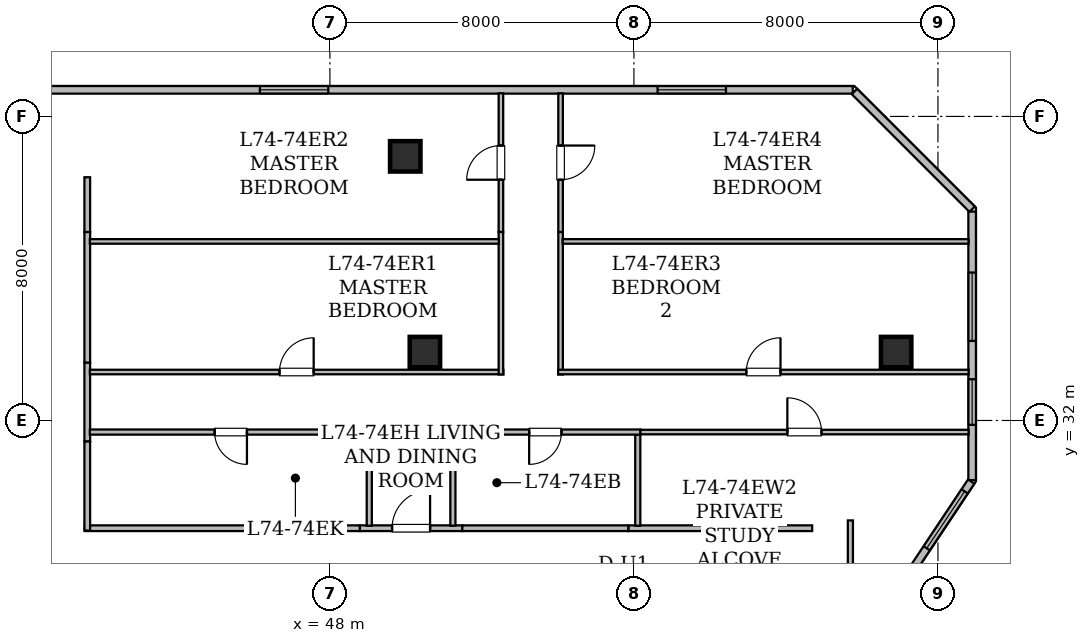
"""IFC4 building model, lengths in metres.
Left out: names, types, materials, properties, quantities, classifications, styles, units other than length and angle.
Written with IfcOpenShell. Run it as: python <this file> out.ifc"""

import sys

from ifc_helpers import new_model, si_unit, direction, frame, frame_2d, origin, origin_2d, place, context, subcontext, project, spatial, rectangle, hollow_rectangle, extrude, element, fill, save


model = new_model("IFC4")
c1 = context("Model", 3, precision=1e-05, world=origin(), true_north=direction((0.0, 1.0)))
c2 = subcontext(c1, "Body", "Model", "MODEL_VIEW")
j1 = project(units=[si_unit("LENGTHUNIT", "METRE"), si_unit("PLANEANGLEUNIT", "RADIAN")], contexts=[c1])
p1 = place(None, origin())
s1 = spatial("IfcSite", under=j1, at=p1, CompositionType="ELEMENT")
p2 = place(p1, origin())
s2 = spatial("IfcBuilding", under=s1, at=p2, CompositionType="ELEMENT")
p3 = place(p2, frame((0.0, 0.0, 290.45)))
s3 = spatial("IfcBuildingStorey", under=s2, at=p3, CompositionType="ELEMENT", Elevation=290.45)
for number, where, z_axis, x_axis in (
    (1, (49.983, 38.95, 0.0), (0.0, 0.0, 1.0), (1.0, 0.0, 0.0)),
    (2, (59.95, 38.95, 0.0), (0.0, 0.0, 1.0), (1.0, 0.0, 0.0)),
    (3, (62.9, 33.8, 0.0), (0.0, 0.0, 1.0), (1.0, 0.0, 0.0)),
):
    element("IfcColumn", number, at=place(p3, frame(where, z_axis=z_axis, x_axis=x_axis)), inside=s3, PredefinedType="COLUMN", context=c2, shape_type="SweptSolid", body=[
        extrude(hollow_rectangle(XDim=0.8, YDim=0.8, WallThickness=0.04, at=origin_2d()), origin(), (0.0, 0.0, 1.0), 4.175),
    ])
p4 = place(p3, frame((50.5, 33.8, 0.0), z_axis=(0.0, 0.0, 1.0), x_axis=(1.0, 0.0, 0.0)))
e4 = element("IfcColumn", 4, at=p4, inside=s3, PredefinedType="COLUMN", context=c2, shape_type="SweptSolid", body=[
    extrude(hollow_rectangle(XDim=0.8, YDim=0.8, WallThickness=0.04, at=origin_2d()), origin(), (0.0, 0.0, 1.0), 4.2),
])
p5 = place(p3, frame((28.302, 40.7, 0.0), z_axis=(0.0, 0.0, 1.0), x_axis=(1.0, 0.0, 0.0)))
e5 = element("IfcWall", 5, at=p5, inside=s3, PredefinedType="STANDARD", context=c2, shape_type="SweptSolid", body=[
    extrude(rectangle(XDim=33.457, YDim=0.2, at=frame_2d((16.729, 0.0))), origin(), (0.0, 0.0, 1.0), 3.78),
])
p6 = place(p5, frame((17.855, 0.0, 0.85)))
e6 = element("IfcOpeningElement", 6, at=p6, cuts=e5, PredefinedType="OPENING", context=c2, shape_type="SweptSolid", body=[
    extrude(rectangle(XDim=1.8, YDim=0.92, at=frame_2d((0.9, 0.46))), frame((0.0, 0.11, 0.0), z_axis=(0.0, -1.0, 0.0), x_axis=(1.0, 0.0, 0.0)), (0.0, 0.0, 1.0), 0.22),
])
p7 = place(p5, frame((28.32, 0.0, 0.85)))
e7 = element("IfcOpeningElement", 7, at=p7, cuts=e5, PredefinedType="OPENING", context=c2, shape_type="SweptSolid", body=[
    extrude(rectangle(XDim=1.8, YDim=0.92, at=frame_2d((0.9, 0.46))), frame((0.0, 0.11, 0.0), z_axis=(0.0, -1.0, 0.0), x_axis=(1.0, 0.0, 0.0)), (0.0, 0.0, 1.0), 0.22),
])
p8 = place(p3, frame((61.803, 40.656, 0.0), z_axis=(0.0, 0.0, 1.0), x_axis=(0.707106781187, -0.707106781187, 0.0)))
e8 = element("IfcWall", 8, at=p8, inside=s3, PredefinedType="STANDARD", context=c2, shape_type="SweptSolid", body=[
    extrude(rectangle(XDim=4.38, YDim=0.2, at=frame_2d((2.19, 0.0))), origin(), (0.0, 0.0, 1.0), 3.78),
])
p9 = place(p3, frame((64.9, 37.497, 0.0), z_axis=(0.0, 0.0, 1.0), x_axis=(0.0, -1.0, 0.0)))
e9 = element("IfcWall", 9, at=p9, inside=s3, PredefinedType="STANDARD", context=c2, shape_type="SweptSolid", body=[
    extrude(rectangle(XDim=7.067, YDim=0.2, at=frame_2d((3.534, 0.0))), origin(), (0.0, 0.0, 1.0), 3.78),
])
p10 = place(p9, frame((4.412, 0.0, 0.78)))
e10 = element("IfcOpeningElement", 10, at=p10, cuts=e9, PredefinedType="OPENING", context=c2, shape_type="SweptSolid", body=[
    extrude(rectangle(XDim=1.2, YDim=1.5, at=frame_2d((0.6, 0.75))), frame((0.0, 0.11, 0.0), z_axis=(0.0, -1.0, 0.0), x_axis=(1.0, 0.0, 0.0)), (0.0, 0.0, 1.0), 0.22),
])
p11 = place(p9, frame((1.604, 0.0, 0.85)))
e11 = element("IfcOpeningElement", 11, at=p11, cuts=e9, PredefinedType="OPENING", context=c2, shape_type="SweptSolid", body=[
    extrude(rectangle(XDim=1.8, YDim=0.92, at=frame_2d((0.9, 0.46))), frame((0.0, 0.11, 0.0), z_axis=(0.0, -1.0, 0.0), x_axis=(1.0, 0.0, 0.0)), (0.0, 0.0, 1.0), 0.22),
])
p12 = place(p3, frame((64.875, 30.392, 0.0), z_axis=(0.0, 0.0, 1.0), x_axis=(-0.554758983133, -0.832011100066, 0.0)))
e12 = element("IfcWall", 12, at=p12, inside=s3, PredefinedType="STANDARD", context=c2, shape_type="SweptSolid", body=[
    extrude(rectangle(XDim=2.875, YDim=0.2, at=frame_2d((1.438, 0.0))), origin(), (0.0, 0.0, 1.0), 3.78),
])
p13 = place(p12, frame((0.309, 0.0, 0.85)))
e13 = element("IfcOpeningElement", 13, at=p13, cuts=e12, PredefinedType="OPENING", context=c2, shape_type="SweptSolid", body=[
    extrude(rectangle(XDim=1.8, YDim=0.92, at=frame_2d((0.9, 0.46))), frame((0.0, 0.11, 0.0), z_axis=(0.0, -1.0, 0.0), x_axis=(1.0, 0.0, 0.0)), (0.0, 0.0, 1.0), 0.22),
])
p14 = place(p3, frame((55.852, 29.165, 0.0), z_axis=(0.0, 0.0, 1.0), x_axis=(1.0, 0.0, 0.0)))
e14 = element("IfcWall", 14, at=p14, inside=s3, PredefinedType="STANDARD", context=c2, shape_type="SweptSolid", body=[
    extrude(rectangle(XDim=4.838, YDim=0.15, at=frame_2d((2.419, 0.0))), origin(), (0.0, 0.0, 1.0), 3.78),
])
p15 = place(p3, frame((48.787, 29.165, 0.0), z_axis=(0.0, 0.0, 1.0), x_axis=(1.0, 0.0, 0.0)))
e15 = element("IfcWall", 15, at=p15, inside=s3, PredefinedType="STANDARD", context=c2, shape_type="SweptSolid", body=[
    extrude(rectangle(XDim=2.698, YDim=0.15, at=frame_2d((1.349, 0.0))), origin(), (0.0, 0.0, 1.0), 2.22),
])
p16 = place(p15, frame((0.849, 0.0, 0.0)))
e16 = element("IfcOpeningElement", 16, at=p16, cuts=e15, PredefinedType="OPENING", context=c2, shape_type="SweptSolid", body=[
    extrude(rectangle(XDim=1.0, YDim=2.15, at=frame_2d((0.5, 1.075))), frame((0.0, 0.085, 0.0), z_axis=(0.0, -1.0, 0.0), x_axis=(1.0, 0.0, 0.0)), (0.0, 0.0, 1.0), 0.17),
])
p17 = place(p3, frame((41.615, 33.524, 0.0), z_axis=(0.0, 0.0, 1.0), x_axis=(0.0, -1.0, 0.0)))
e17 = element("IfcWall", 17, at=p17, inside=s3, PredefinedType="STANDARD", context=c2, shape_type="SweptSolid", body=[
    extrude(rectangle(XDim=2.078, YDim=0.15, at=frame_2d((1.039, 0.0))), origin(), (0.0, 0.0, 1.0), 2.22),
])
p18 = place(p3, frame((51.485, 29.165, 0.0), z_axis=(0.0, 0.0, 1.0), x_axis=(1.0, 0.0, 0.0)))
e18 = element("IfcWall", 18, at=p18, inside=s3, PredefinedType="STANDARD", context=c2, shape_type="SweptSolid", body=[
    extrude(rectangle(XDim=4.367, YDim=0.15, at=frame_2d((2.184, 0.0))), origin(), (0.0, 0.0, 1.0), 2.22),
])
p19 = place(p3, frame((41.55, 29.165, 0.0), z_axis=(0.0, 0.0, 1.0), x_axis=(1.0, 0.0, 0.0)))
e19 = element("IfcWall", 19, at=p19, inside=s3, PredefinedType="STANDARD", context=c2, shape_type="SweptSolid", body=[
    extrude(rectangle(XDim=7.237, YDim=0.15, at=frame_2d((3.619, 0.0))), origin(), (0.0, 0.0, 1.0), 3.78),
])
p20 = place(p3, frame((41.615, 31.446, 0.0), z_axis=(0.0, 0.0, 1.0), x_axis=(0.0, -1.0, 0.0)))
e20 = element("IfcWall", 20, at=p20, inside=s3, PredefinedType="STANDARD", context=c2, shape_type="SweptSolid", body=[
    extrude(rectangle(XDim=2.344, YDim=0.15, at=frame_2d((1.172, 0.0))), origin(), (0.0, 0.0, 1.0), 3.78),
])
p21 = place(p3, frame((41.615, 36.96, 0.0), z_axis=(0.0, 0.0, 1.0), x_axis=(0.0, -1.0, 0.0)))
e21 = element("IfcWall", 21, at=p21, inside=s3, PredefinedType="STANDARD", context=c2, shape_type="SweptSolid", body=[
    extrude(rectangle(XDim=3.436, YDim=0.15, at=frame_2d((1.718, 0.0))), origin(), (0.0, 0.0, 1.0), 2.22),
])
p22 = place(p3, frame((41.615, 38.4, 0.0), z_axis=(0.0, 0.0, 1.0), x_axis=(0.0, -1.0, 0.0)))
e22 = element("IfcWall", 22, at=p22, inside=s3, PredefinedType="STANDARD", context=c2, shape_type="SweptSolid", body=[
    extrude(rectangle(XDim=1.44, YDim=0.15, at=frame_2d((0.72, 0.0))), origin(), (0.0, 0.0, 1.0), 2.22),
])
p23 = place(p3, frame((61.696, 23.687, 0.0), z_axis=(0.0, 0.0, 1.0), x_axis=(0.0, 1.0, 0.0)))
e23 = element("IfcWall", 23, at=p23, inside=s3, PredefinedType="PARTITIONING", context=c2, shape_type="SweptSolid", body=[
    extrude(rectangle(XDim=5.683, YDim=0.135, at=frame_2d((2.842, 0.0))), origin(), (0.0, 0.0, 1.0), 2.22),
])
p24 = place(p3, frame((56.166, 31.695, 0.0), z_axis=(0.0, 0.0, 1.0), x_axis=(1.0, 0.0, 0.0)))
e24 = element("IfcWall", 24, at=p24, inside=s3, PredefinedType="PARTITIONING", context=c2, shape_type="SweptSolid", body=[
    extrude(rectangle(XDim=8.642, YDim=0.12, at=frame_2d((4.321, 0.0))), origin(), (0.0, 0.0, 1.0), 2.22),
])
p25 = place(p24, frame((3.871, 0.0, 0.0)))
e25 = element("IfcOpeningElement", 25, at=p25, cuts=e24, PredefinedType="OPENING", context=c2, shape_type="SweptSolid", body=[
    extrude(rectangle(XDim=0.9, YDim=2.1, at=frame_2d((0.45, 1.05))), frame((0.0, 0.07, 0.0), z_axis=(0.0, -1.0, 0.0), x_axis=(1.0, 0.0, 0.0)), (0.0, 0.0, 1.0), 0.14),
])
p26 = place(p3, frame((56.101, 29.23, 0.0), z_axis=(0.0, 0.0, 1.0), x_axis=(0.0, 1.0, 0.0)))
e26 = element("IfcWall", 26, at=p26, inside=s3, PredefinedType="PARTITIONING", context=c2, shape_type="SweptSolid", body=[
    extrude(rectangle(XDim=2.4, YDim=0.135, at=frame_2d((1.2, 0.0))), origin(), (0.0, 0.0, 1.0), 3.78),
])
p27 = place(p3, frame((56.166, 31.695, 0.0), z_axis=(0.0, 0.0, 1.0), x_axis=(-1.0, 0.0, 0.0)))
e27 = element("IfcWall", 27, at=p27, inside=s3, PredefinedType="PARTITIONING", context=c2, shape_type="SweptSolid", body=[
    extrude(rectangle(XDim=4.995, YDim=0.135, at=frame_2d((2.498, 0.0))), origin(), (0.0, 0.0, 1.0), 2.22),
])
p28 = place(p27, frame((2.073, 0.0, 0.0)))
e28 = element("IfcOpeningElement", 28, at=p28, cuts=e27, PredefinedType="OPENING", context=c2, shape_type="SweptSolid", body=[
    extrude(rectangle(XDim=0.85, YDim=2.1, at=frame_2d((0.425, 1.05))), frame((0.0, 0.077, 0.0), z_axis=(0.0, -1.0, 0.0), x_axis=(1.0, 0.0, 0.0)), (0.0, 0.0, 1.0), 0.155),
])
for number, where, z_axis, x_axis in (
    (29, (51.236, 31.76, 0.0), (0.0, 0.0, 1.0), (0.0, -1.0, 0.0)),
    (30, (49.036, 29.23, 0.0), (0.0, 0.0, 1.0), (0.0, 1.0, 0.0)),
):
    element("IfcWall", number, at=place(p3, frame(where, z_axis=z_axis, x_axis=x_axis)), inside=s3, PredefinedType="PARTITIONING", context=c2, shape_type="SweptSolid", body=[
        extrude(rectangle(XDim=2.53, YDim=0.135, at=frame_2d((1.265, 0.0))), origin(), (0.0, 0.0, 1.0), 3.78),
    ])
p29 = place(p3, frame((49.101, 31.695, 0.0), z_axis=(0.0, 0.0, 1.0), x_axis=(-1.0, 0.0, 0.0)))
e31 = element("IfcWall", 31, at=p29, inside=s3, PredefinedType="PARTITIONING", context=c2, shape_type="SweptSolid", body=[
    extrude(rectangle(XDim=7.419, YDim=0.135, at=frame_2d((3.709, 0.0))), origin(), (0.0, 0.0, 1.0), 3.78),
])
p30 = place(p29, frame((3.284, 0.0, 0.0)))
e32 = element("IfcOpeningElement", 32, at=p30, cuts=e31, PredefinedType="OPENING", context=c2, shape_type="SweptSolid", body=[
    extrude(rectangle(XDim=0.85, YDim=2.1, at=frame_2d((0.425, 1.05))), frame((0.0, 0.077, 0.0), z_axis=(0.0, -1.0, 0.0), x_axis=(1.0, 0.0, 0.0)), (0.0, 0.0, 1.0), 0.155),
])
p31 = place(p3, frame((41.682, 33.275, 0.0), z_axis=(0.0, 0.0, 1.0), x_axis=(1.0, 0.0, 0.0)))
e33 = element("IfcWall", 33, at=p31, inside=s3, PredefinedType="PARTITIONING", context=c2, shape_type="SweptSolid", body=[
    extrude(rectangle(XDim=10.883, YDim=0.12, at=frame_2d((5.441, 0.0))), origin(), (0.0, 0.0, 1.0), 2.22),
])
p32 = place(p31, frame((4.991, 0.0, 0.0)))
e34 = element("IfcOpeningElement", 34, at=p32, cuts=e33, PredefinedType="OPENING", context=c2, shape_type="SweptSolid", body=[
    extrude(rectangle(XDim=0.9, YDim=2.1, at=frame_2d((0.45, 1.05))), frame((0.0, 0.07, 0.0), z_axis=(0.0, -1.0, 0.0), x_axis=(1.0, 0.0, 0.0)), (0.0, 0.0, 1.0), 0.14),
])
p33 = place(p3, frame((52.5, 33.21, 0.0), z_axis=(0.0, 0.0, 1.0), x_axis=(0.0, 1.0, 0.0)))
e35 = element("IfcWall", 35, at=p33, inside=s3, PredefinedType="PARTITIONING", context=c2, shape_type="SweptSolid", body=[
    extrude(rectangle(XDim=3.75, YDim=0.12, at=frame_2d((1.875, 0.0))), origin(), (0.0, 0.0, 1.0), 2.22),
])
p34 = place(p3, frame((52.5, 36.96, 0.0), z_axis=(0.0, 0.0, 1.0), x_axis=(0.0, 1.0, 0.0)))
e36 = element("IfcWall", 36, at=p34, inside=s3, PredefinedType="PARTITIONING", context=c2, shape_type="SweptSolid", body=[
    extrude(rectangle(XDim=3.648, YDim=0.12, at=frame_2d((1.824, 0.0))), origin(), (0.0, 0.0, 1.0), 2.22),
])
p35 = place(p34, frame((1.374, 0.0, 0.0)))
e37 = element("IfcOpeningElement", 37, at=p35, cuts=e36, PredefinedType="OPENING", context=c2, shape_type="SweptSolid", body=[
    extrude(rectangle(XDim=0.9, YDim=2.1, at=frame_2d((0.45, 1.05))), frame((0.0, 0.07, 0.0), z_axis=(0.0, -1.0, 0.0), x_axis=(1.0, 0.0, 0.0)), (0.0, 0.0, 1.0), 0.14),
])
p36 = place(p3, frame((54.07, 36.96, 0.0), z_axis=(0.0, 0.0, 1.0), x_axis=(0.0, -1.0, 0.0)))
e38 = element("IfcWall", 38, at=p36, inside=s3, PredefinedType="PARTITIONING", context=c2, shape_type="SweptSolid", body=[
    extrude(rectangle(XDim=3.75, YDim=0.12, at=frame_2d((1.875, 0.0))), origin(), (0.0, 0.0, 1.0), 2.22),
])
p37 = place(p3, frame((54.005, 33.275, 0.0), z_axis=(0.0, 0.0, 1.0), x_axis=(1.0, 0.0, 0.0)))
e39 = element("IfcWall", 39, at=p37, inside=s3, PredefinedType="PARTITIONING", context=c2, shape_type="SweptSolid", body=[
    extrude(rectangle(XDim=10.803, YDim=0.12, at=frame_2d((5.402, 0.0))), origin(), (0.0, 0.0, 1.0), 2.22),
])
p38 = place(p37, frame((4.952, 0.0, 0.0)))
e40 = element("IfcOpeningElement", 40, at=p38, cuts=e39, PredefinedType="OPENING", context=c2, shape_type="SweptSolid", body=[
    extrude(rectangle(XDim=0.9, YDim=2.1, at=frame_2d((0.45, 1.05))), frame((0.0, 0.07, 0.0), z_axis=(0.0, -1.0, 0.0), x_axis=(1.0, 0.0, 0.0)), (0.0, 0.0, 1.0), 0.14),
])
p39 = place(p3, frame((54.07, 40.608, 0.0), z_axis=(0.0, 0.0, 1.0), x_axis=(0.0, -1.0, 0.0)))
e41 = element("IfcWall", 41, at=p39, inside=s3, PredefinedType="PARTITIONING", context=c2, shape_type="SweptSolid", body=[
    extrude(rectangle(XDim=3.648, YDim=0.12, at=frame_2d((1.824, 0.0))), origin(), (0.0, 0.0, 1.0), 2.22),
])
p40 = place(p39, frame((1.374, 0.0, 0.0)))
e42 = element("IfcOpeningElement", 42, at=p40, cuts=e41, PredefinedType="OPENING", context=c2, shape_type="SweptSolid", body=[
    extrude(rectangle(XDim=0.9, YDim=2.1, at=frame_2d((0.45, 1.05))), frame((0.0, 0.07, 0.0), z_axis=(0.0, -1.0, 0.0), x_axis=(1.0, 0.0, 0.0)), (0.0, 0.0, 1.0), 0.14),
])
p41 = place(p3, frame((41.682, 36.711, 0.0), z_axis=(0.0, 0.0, 1.0), x_axis=(1.0, 0.0, 0.0)))
e43 = element("IfcWall", 43, at=p41, inside=s3, PredefinedType="PARTITIONING", context=c2, shape_type="SweptSolid", body=[
    extrude(rectangle(XDim=10.764, YDim=0.12, at=frame_2d((5.382, 0.0))), origin(), (0.0, 0.0, 1.0), 2.22),
])
p42 = place(p3, frame((54.124, 36.711, 0.0), z_axis=(0.0, 0.0, 1.0), x_axis=(1.0, 0.0, 0.0)))
e44 = element("IfcWall", 44, at=p42, inside=s3, PredefinedType="PARTITIONING", context=c2, shape_type="SweptSolid", body=[
    extrude(rectangle(XDim=10.684, YDim=0.12, at=frame_2d((5.342, 0.0))), origin(), (0.0, 0.0, 1.0), 2.22),
])
p43 = place(p13, origin())
e45 = element("IfcWindow", 45, at=p43, inside=s3, PartitioningType="SINGLE_PANEL", PredefinedType="WINDOW", context=c2, shape_type="SweptSolid", body=[
    extrude(rectangle(XDim=1.8, YDim=0.92, at=frame_2d((0.9, 0.46))), frame((0.0, 0.03, 0.0), z_axis=(0.0, -1.0, 0.0), x_axis=(1.0, 0.0, 0.0)), (0.0, 0.0, 1.0), 0.06),
])
fill(e13, e45)
p44 = place(p10, origin())
e46 = element("IfcWindow", 46, at=p44, inside=s3, PartitioningType="SINGLE_PANEL", PredefinedType="WINDOW", context=c2, shape_type="SweptSolid", body=[
    extrude(rectangle(XDim=1.2, YDim=1.5, at=frame_2d((0.6, 0.75))), frame((0.0, 0.03, 0.0), z_axis=(0.0, -1.0, 0.0), x_axis=(1.0, 0.0, 0.0)), (0.0, 0.0, 1.0), 0.06),
])
fill(e10, e46)
p45 = place(p6, origin())
e47 = element("IfcWindow", 47, at=p45, inside=s3, PartitioningType="SINGLE_PANEL", PredefinedType="WINDOW", context=c2, shape_type="SweptSolid", body=[
    extrude(rectangle(XDim=1.8, YDim=0.92, at=frame_2d((0.9, 0.46))), frame((0.0, 0.03, 0.0), z_axis=(0.0, -1.0, 0.0), x_axis=(1.0, 0.0, 0.0)), (0.0, 0.0, 1.0), 0.06),
])
fill(e6, e47)
p46 = place(p11, origin())
e48 = element("IfcWindow", 48, at=p46, inside=s3, PartitioningType="SINGLE_PANEL", PredefinedType="WINDOW", context=c2, shape_type="SweptSolid", body=[
    extrude(rectangle(XDim=1.8, YDim=0.92, at=frame_2d((0.9, 0.46))), frame((0.0, 0.03, 0.0), z_axis=(0.0, -1.0, 0.0), x_axis=(1.0, 0.0, 0.0)), (0.0, 0.0, 1.0), 0.06),
])
fill(e11, e48)
p47 = place(p7, origin())
e49 = element("IfcWindow", 49, at=p47, inside=s3, PartitioningType="SINGLE_PANEL", PredefinedType="WINDOW", context=c2, shape_type="SweptSolid", body=[
    extrude(rectangle(XDim=1.8, YDim=0.92, at=frame_2d((0.9, 0.46))), frame((0.0, 0.03, 0.0), z_axis=(0.0, -1.0, 0.0), x_axis=(1.0, 0.0, 0.0)), (0.0, 0.0, 1.0), 0.06),
])
fill(e7, e49)
p48 = place(p16, origin())
e50 = element("IfcDoor", 50, at=p48, inside=s3, OperationType="SINGLE_SWING_RIGHT", PredefinedType="DOOR", context=c2, shape_type="SweptSolid", body=[
    extrude(rectangle(XDim=1.0, YDim=2.15, at=frame_2d((0.5, 1.075))), frame((0.0, 0.025, 0.0), z_axis=(0.0, -1.0, 0.0), x_axis=(1.0, 0.0, 0.0)), (0.0, 0.0, 1.0), 0.05),
])
fill(e16, e50)
p49 = place(p25, origin())
e51 = element("IfcDoor", 51, at=p49, inside=s3, OperationType="SINGLE_SWING_LEFT", PredefinedType="DOOR", context=c2, shape_type="SweptSolid", body=[
    extrude(rectangle(XDim=0.9, YDim=2.1, at=frame_2d((0.45, 1.05))), frame((0.0, 0.025, 0.0), z_axis=(0.0, -1.0, 0.0), x_axis=(1.0, 0.0, 0.0)), (0.0, 0.0, 1.0), 0.05),
])
fill(e25, e51)
p50 = place(p28, origin())
e52 = element("IfcDoor", 52, at=p50, inside=s3, OperationType="SINGLE_SWING_RIGHT", PredefinedType="DOOR", context=c2, shape_type="SweptSolid", body=[
    extrude(rectangle(XDim=0.85, YDim=2.1, at=frame_2d((0.425, 1.05))), frame((0.0, 0.025, 0.0), z_axis=(0.0, -1.0, 0.0), x_axis=(1.0, 0.0, 0.0)), (0.0, 0.0, 1.0), 0.05),
])
fill(e28, e52)
p51 = place(p30, origin())
e53 = element("IfcDoor", 53, at=p51, inside=s3, OperationType="SINGLE_SWING_LEFT", PredefinedType="DOOR", context=c2, shape_type="SweptSolid", body=[
    extrude(rectangle(XDim=0.85, YDim=2.1, at=frame_2d((0.425, 1.05))), frame((0.0, 0.025, 0.0), z_axis=(0.0, -1.0, 0.0), x_axis=(1.0, 0.0, 0.0)), (0.0, 0.0, 1.0), 0.05),
])
fill(e32, e53)
p52 = place(p32, origin())
e54 = element("IfcDoor", 54, at=p52, inside=s3, OperationType="SINGLE_SWING_RIGHT", PredefinedType="DOOR", context=c2, shape_type="SweptSolid", body=[
    extrude(rectangle(XDim=0.9, YDim=2.1, at=frame_2d((0.45, 1.05))), frame((0.0, 0.025, 0.0), z_axis=(0.0, -1.0, 0.0), x_axis=(1.0, 0.0, 0.0)), (0.0, 0.0, 1.0), 0.05),
])
fill(e34, e54)
p53 = place(p35, origin())
e55 = element("IfcDoor", 55, at=p53, inside=s3, OperationType="SINGLE_SWING_LEFT", PredefinedType="DOOR", context=c2, shape_type="SweptSolid", body=[
    extrude(rectangle(XDim=0.9, YDim=2.1, at=frame_2d((0.45, 1.05))), frame((0.0, 0.025, 0.0), z_axis=(0.0, -1.0, 0.0), x_axis=(1.0, 0.0, 0.0)), (0.0, 0.0, 1.0), 0.05),
])
fill(e37, e55)
p54 = place(p38, origin())
e56 = element("IfcDoor", 56, at=p54, inside=s3, OperationType="SINGLE_SWING_RIGHT", PredefinedType="DOOR", context=c2, shape_type="SweptSolid", body=[
    extrude(rectangle(XDim=0.9, YDim=2.1, at=frame_2d((0.45, 1.05))), frame((0.0, 0.025, 0.0), z_axis=(0.0, -1.0, 0.0), x_axis=(1.0, 0.0, 0.0)), (0.0, 0.0, 1.0), 0.05),
])
fill(e40, e56)
p55 = place(p40, origin())
e57 = element("IfcDoor", 57, at=p55, inside=s3, OperationType="SINGLE_SWING_LEFT", PredefinedType="DOOR", context=c2, shape_type="SweptSolid", body=[
    extrude(rectangle(XDim=0.9, YDim=2.1, at=frame_2d((0.45, 1.05))), frame((0.0, 0.025, 0.0), z_axis=(0.0, -1.0, 0.0), x_axis=(1.0, 0.0, 0.0)), (0.0, 0.0, 1.0), 0.05),
])
fill(e42, e57)
save(model, sys.argv[1])
